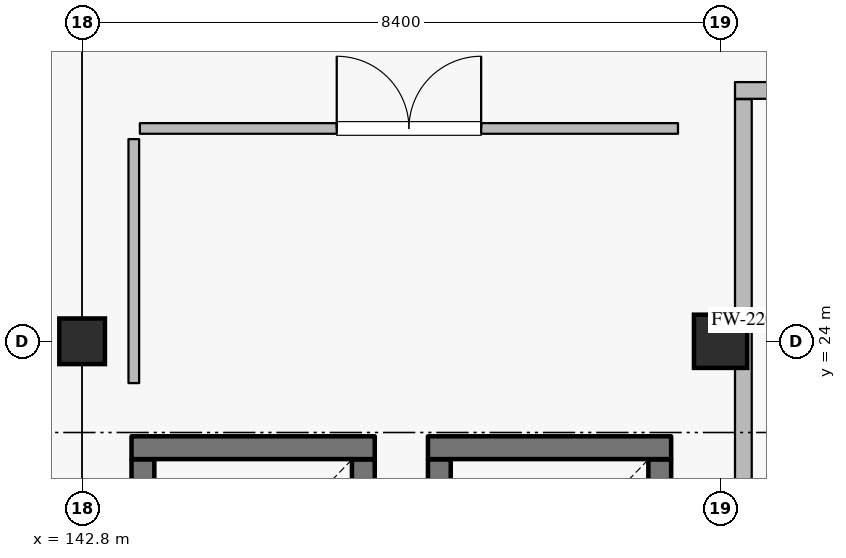
"""IFC4 building model, lengths in metres.
Left out: names, types, materials, properties, quantities, classifications, styles, units other than length and angle.
Written with IfcOpenShell. Run it as: python <this file> out.ifc"""

import sys

from ifc_helpers import new_model, si_unit, direction, frame, frame_2d, origin, origin_2d, place, context, subcontext, project, spatial, rectangle, extrude, element, fill, save


model = new_model("IFC4")
c1 = context("Model", 3, precision=1e-05, world=origin(), true_north=direction((0.0, 1.0)))
c2 = subcontext(c1, "Body", "Model", "MODEL_VIEW")
j1 = project(units=[si_unit("LENGTHUNIT", "METRE"), si_unit("PLANEANGLEUNIT", "RADIAN")], contexts=[c1])
p1 = place(None, origin())
s1 = spatial("IfcSite", under=j1, at=p1, CompositionType="ELEMENT")
p2 = place(p1, origin())
s2 = spatial("IfcBuilding", under=s1, at=p2, CompositionType="ELEMENT")
p3 = place(p2, frame((0.0, 0.0, 32.4)))
s3 = spatial("IfcBuildingStorey", under=s2, at=p3, CompositionType="ELEMENT", Elevation=32.4)
p4 = place(p3, frame((151.2, 24.0, 0.0), z_axis=(0.0, 0.0, 1.0), x_axis=(1.0, 0.0, 0.0)))
e1 = element("IfcColumn", 1, at=p4, inside=s3, PredefinedType="COLUMN", context=c2, shape_type="SweptSolid", body=[
    extrude(rectangle(XDim=0.7, YDim=0.7, at=origin_2d()), origin(), (0.0, 0.0, 1.0), 3.6),
])
p5 = place(p3, frame((142.8, 24.0, 0.0), z_axis=(0.0, 0.0, 1.0), x_axis=(1.0, 0.0, 0.0)))
e2 = element("IfcColumn", 2, at=p5, inside=s3, PredefinedType="COLUMN", context=c2, shape_type="SweptSolid", body=[
    extrude(rectangle(XDim=0.6, YDim=0.6, at=origin_2d()), origin(), (0.0, 0.0, 1.0), 3.6),
])
p6 = place(p3, frame((146.5, 19.755, 0.0), z_axis=(0.0, 0.0, 1.0), x_axis=(0.0, 1.0, 0.0)))
e3 = element("IfcWall", 3, at=p6, inside=s3, PredefinedType="SHEAR", context=c2, shape_type="SweptSolid", body=[
    extrude(rectangle(XDim=2.69, YDim=0.3, at=frame_2d((1.345, 0.0))), origin(), (0.0, 0.0, 1.0), 3.335),
])
p7 = place(p3, frame((146.65, 22.6, 0.0), z_axis=(0.0, 0.0, 1.0), x_axis=(-1.0, 0.0, 0.0)))
e4 = element("IfcWall", 4, at=p7, inside=s3, PredefinedType="SHEAR", context=c2, shape_type="SweptSolid", body=[
    extrude(rectangle(XDim=3.2, YDim=0.3, at=frame_2d((1.6, 0.0))), origin(), (0.0, 0.0, 1.0), 3.335),
])
for number, where, z_axis, x_axis in (
    (5, (143.6, 22.445, 0.0), (0.0, 0.0, 1.0), (0.0, -1.0, 0.0)),
    (6, (150.4, 19.755, 0.0), (0.0, 0.0, 1.0), (0.0, 1.0, 0.0)),
):
    element("IfcWall", number, at=place(p3, frame(where, z_axis=z_axis, x_axis=x_axis)), inside=s3, PredefinedType="SHEAR", context=c2, shape_type="SweptSolid", body=[
        extrude(rectangle(XDim=2.69, YDim=0.3, at=frame_2d((1.345, 0.0))), origin(), (0.0, 0.0, 1.0), 3.335),
    ])
p8 = place(p3, frame((150.55, 22.6, 0.0), z_axis=(0.0, 0.0, 1.0), x_axis=(-1.0, 0.0, 0.0)))
e7 = element("IfcWall", 7, at=p8, inside=s3, PredefinedType="SHEAR", context=c2, shape_type="SweptSolid", body=[
    extrude(rectangle(XDim=3.2, YDim=0.3, at=frame_2d((1.6, 0.0))), origin(), (0.0, 0.0, 1.0), 3.335),
])
p9 = place(p3, frame((147.5, 22.445, 0.0), z_axis=(0.0, 0.0, 1.0), x_axis=(0.0, -1.0, 0.0)))
e8 = element("IfcWall", 8, at=p9, inside=s3, PredefinedType="SHEAR", context=c2, shape_type="SweptSolid", body=[
    extrude(rectangle(XDim=2.69, YDim=0.3, at=frame_2d((1.345, 0.0))), origin(), (0.0, 0.0, 1.0), 3.335),
])
p10 = place(p3, frame((151.5, 21.365, 0.0), z_axis=(0.0, 0.0, 1.0), x_axis=(0.0, 1.0, 0.0)))
e9 = element("IfcWall", 9, at=p10, inside=s3, PredefinedType="PARTITIONING", context=c2, shape_type="SweptSolid", body=[
    extrude(rectangle(XDim=5.82, YDim=0.22, at=frame_2d((2.91, 0.0))), origin(), (0.0, 0.0, 1.0), 3.335),
])
p11 = place(p3, frame((151.39, 27.3, 0.0), z_axis=(0.0, 0.0, 1.0), x_axis=(1.0, 0.0, 0.0)))
e10 = element("IfcWall", 10, at=p11, inside=s3, PredefinedType="PARTITIONING", context=c2, shape_type="SweptSolid", body=[
    extrude(rectangle(XDim=3.82, YDim=0.22, at=frame_2d((1.91, 0.0))), origin(), (0.0, 0.0, 1.0), 3.335),
])
p12 = place(p11, frame((1.35, 0.0, 0.0)))
e11 = element("IfcOpeningElement", 11, at=p12, cuts=e10, PredefinedType="OPENING", context=c2, shape_type="SweptSolid", body=[
    extrude(rectangle(XDim=1.12, YDim=2.2, at=frame_2d((0.56, 1.1))), frame((0.0, 0.12, 0.0), z_axis=(0.0, -1.0, 0.0), x_axis=(1.0, 0.0, 0.0)), (0.0, 0.0, 1.0), 0.24),
])
p13 = place(p3, frame((143.56, 26.8, 0.0), z_axis=(0.0, 0.0, 1.0), x_axis=(1.0, 0.0, 0.0)))
e12 = element("IfcWall", 12, at=p13, inside=s3, PredefinedType="PARTITIONING", context=c2, shape_type="SweptSolid", body=[
    extrude(rectangle(XDim=7.08, YDim=0.14, at=frame_2d((3.54, 0.0))), origin(), (0.0, 0.0, 1.0), 3.335),
])
p14 = place(p13, frame((2.59, 0.0, 0.0)))
e13 = element("IfcOpeningElement", 13, at=p14, cuts=e12, PredefinedType="OPENING", context=c2, shape_type="SweptSolid", body=[
    extrude(rectangle(XDim=1.9, YDim=2.4, at=frame_2d((0.95, 1.2))), frame((0.0, 0.08, 0.0), z_axis=(0.0, -1.0, 0.0), x_axis=(1.0, 0.0, 0.0)), (0.0, 0.0, 1.0), 0.16),
])
p15 = place(p3, frame((143.48, 23.45, 0.0), z_axis=(0.0, 0.0, 1.0), x_axis=(0.0, 1.0, 0.0)))
e14 = element("IfcWall", 14, at=p15, inside=s3, PredefinedType="PARTITIONING", context=c2, shape_type="SweptSolid", body=[
    extrude(rectangle(XDim=3.21, YDim=0.14, at=frame_2d((1.605, 0.0))), origin(), (0.0, 0.0, 1.0), 3.335),
])
p16 = place(p14, origin())
e15 = element("IfcDoor", 15, at=p16, inside=s3, OperationType="DOUBLE_DOOR_SINGLE_SWING", PredefinedType="DOOR", context=c2, shape_type="SweptSolid", body=[
    extrude(rectangle(XDim=1.9, YDim=2.4, at=frame_2d((0.95, 1.2))), frame((0.0, 0.025, 0.0), z_axis=(0.0, -1.0, 0.0), x_axis=(1.0, 0.0, 0.0)), (0.0, 0.0, 1.0), 0.05),
])
fill(e13, e15)
save(model, sys.argv[1])
